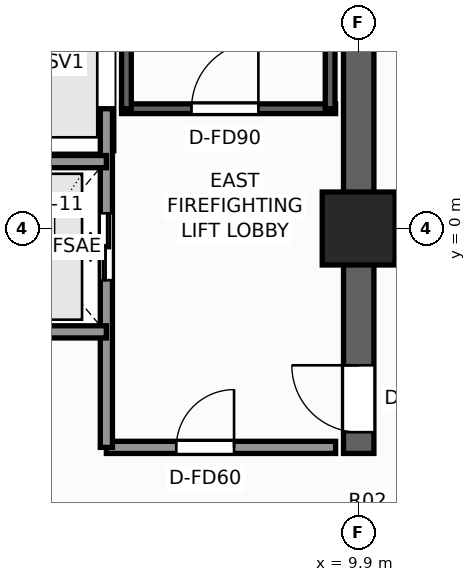
"""IFC4 building model, lengths in metres.
Left out: names, types, materials, properties, quantities, classifications, styles, units other than length and angle.
Written with IfcOpenShell. Run it as: python <this file> out.ifc"""

import sys

from ifc_helpers import new_model, si_unit, direction, frame, frame_2d, origin, origin_2d, place, context, subcontext, project, spatial, rectangle, extrude, element, fill, save


model = new_model("IFC4")
c1 = context("Model", 3, precision=1e-05, world=origin(), true_north=direction((0.0, 1.0)))
c2 = subcontext(c1, "Body", "Model", "MODEL_VIEW")
j1 = project(units=[si_unit("LENGTHUNIT", "METRE"), si_unit("PLANEANGLEUNIT", "RADIAN")], contexts=[c1])
p1 = place(None, origin())
s1 = spatial("IfcSite", under=j1, at=p1, CompositionType="ELEMENT")
p2 = place(p1, origin())
s2 = spatial("IfcBuilding", under=s1, at=p2, CompositionType="ELEMENT")
p3 = place(p2, frame((0.0, 0.0, 180.0)))
s3 = spatial("IfcBuildingStorey", under=s2, at=p3, CompositionType="ELEMENT", Elevation=180.0)
p4 = place(p3, frame((9.9, -3.7, 0.0), z_axis=(0.0, 0.0, 1.0), x_axis=(0.0, 1.0, 0.0)))
e1 = element("IfcWall", 1, at=p4, inside=s3, PredefinedType="SHEAR", context=c2, shape_type="SweptSolid", body=[
    extrude(rectangle(XDim=13.35, YDim=0.5, at=frame_2d((6.675, 0.0))), origin(), (0.0, 0.0, 1.0), 3.3),
])
p5 = place(p4, frame((0.35, 0.0, 0.0)))
e2 = element("IfcOpeningElement", 2, at=p5, cuts=e1, PredefinedType="OPENING", context=c2, shape_type="SweptSolid", body=[
    extrude(rectangle(XDim=1.1, YDim=2.2, at=frame_2d((0.55, 1.1))), frame((0.0, 0.26, 0.0), z_axis=(0.0, -1.0, 0.0), x_axis=(1.0, 0.0, 0.0)), (0.0, 0.0, 1.0), 0.52),
])
p6 = place(p3, frame((9.9, 0.0, 0.0), z_axis=(0.0, 0.0, 1.0), x_axis=(1.0, 0.0, 0.0)))
e3 = element("IfcColumn", 3, at=p6, inside=s3, PredefinedType="COLUMN", context=c2, shape_type="SweptSolid", body=[
    extrude(rectangle(XDim=1.2, YDim=1.2, at=origin_2d()), origin(), (0.0, 0.0, 1.0), 3.3),
])
p7 = place(p3, frame((6.0, 1.97, 0.0), z_axis=(0.0, 0.0, 1.0), x_axis=(1.0, 0.0, 0.0)))
e4 = element("IfcWall", 4, at=p7, inside=s3, PredefinedType="SHEAR", context=c2, shape_type="SweptSolid", body=[
    extrude(rectangle(XDim=3.52, YDim=0.16, at=frame_2d((1.76, 0.0))), origin(), (0.0, 0.0, 1.0), 3.3),
])
p8 = place(p7, frame((1.15, 0.0, 0.0)))
e5 = element("IfcOpeningElement", 5, at=p8, cuts=e4, PredefinedType="OPENING", context=c2, shape_type="SweptSolid", body=[
    extrude(rectangle(XDim=1.1, YDim=2.2, at=frame_2d((0.55, 1.1))), frame((0.0, 0.09, 0.0), z_axis=(0.0, -1.0, 0.0), x_axis=(1.0, 0.0, 0.0)), (0.0, 0.0, 1.0), 0.18),
])
for number, where, z_axis, x_axis in (
    (6, (6.08, 1.97, 0.0), (0.0, 0.0, 1.0), (0.0, 1.0, 0.0)),
    (7, (9.43, 1.97, 0.0), (0.0, 0.0, 1.0), (0.0, 1.0, 0.0)),
):
    element("IfcWall", number, at=place(p3, frame(where, z_axis=z_axis, x_axis=x_axis)), inside=s3, PredefinedType="SHEAR", context=c2, shape_type="SweptSolid", body=[
        extrude(rectangle(XDim=7.56, YDim=0.16, at=frame_2d((3.78, 0.0))), origin(), (0.0, 0.0, 1.0), 3.3),
    ])
p9 = place(p3, frame((5.75, -3.6, 0.0), z_axis=(0.0, 0.0, 1.0), x_axis=(1.0, 0.0, 0.0)))
e8 = element("IfcWall", 8, at=p9, inside=s3, PredefinedType="SOLIDWALL", context=c2, shape_type="SweptSolid", body=[
    extrude(rectangle(XDim=3.77, YDim=0.2, at=frame_2d((1.885, 0.0))), origin(), (0.0, 0.0, 1.0), 3.08),
])
p10 = place(p9, frame((1.15, 0.0, 0.0)))
e9 = element("IfcOpeningElement", 9, at=p10, cuts=e8, PredefinedType="OPENING", context=c2, shape_type="SweptSolid", body=[
    extrude(rectangle(XDim=0.95, YDim=2.06, at=frame_2d((0.475, 1.03))), frame((0.0, 0.11, 0.0), z_axis=(0.0, -1.0, 0.0), x_axis=(1.0, 0.0, 0.0)), (0.0, 0.0, 1.0), 0.22),
])
p11 = place(p3, frame((5.75, -3.6, 0.0), z_axis=(0.0, 0.0, 1.0), x_axis=(0.0, 1.0, 0.0)))
e10 = element("IfcWall", 10, at=p11, inside=s3, PredefinedType="SOLIDWALL", context=c2, shape_type="SweptSolid", body=[
    extrude(rectangle(XDim=5.57, YDim=0.2, at=frame_2d((2.785, 0.0))), origin(), (0.0, 0.0, 1.0), 2.715),
])
p12 = place(p11, frame((2.75, 0.0, 0.0)))
e11 = element("IfcOpeningElement", 11, at=p12, cuts=e10, PredefinedType="OPENING", context=c2, shape_type="SweptSolid", body=[
    extrude(rectangle(XDim=1.1, YDim=2.2, at=frame_2d((0.55, 1.1))), frame((0.0, 0.11, 0.0), z_axis=(0.0, -1.0, 0.0), x_axis=(1.0, 0.0, 0.0)), (0.0, 0.0, 1.0), 0.22),
])
for number, where, z_axis, x_axis in (
    (12, (3.35, -1.7, 0.0), (0.0, 0.0, 1.0), (1.0, 0.0, 0.0)),
    (13, (3.35, 1.1, 0.0), (0.0, 0.0, 1.0), (1.0, 0.0, 0.0)),
):
    element("IfcWall", number, at=place(p3, frame(where, z_axis=z_axis, x_axis=x_axis)), inside=s3, PredefinedType="SOLIDWALL", context=c2, shape_type="SweptSolid", body=[
        extrude(rectangle(XDim=2.4, YDim=0.2, at=frame_2d((1.2, 0.0))), origin(), (0.0, 0.0, 1.0), 3.08),
    ])
p13 = place(p8, origin())
e14 = element("IfcDoor", 14, at=p13, inside=s3, OperationType="SINGLE_SWING_RIGHT", PredefinedType="DOOR", context=c2, shape_type="SweptSolid", body=[
    extrude(rectangle(XDim=1.1, YDim=2.2, at=frame_2d((0.55, 1.1))), frame((0.0, 0.025, 0.0), z_axis=(0.0, -1.0, 0.0), x_axis=(1.0, 0.0, 0.0)), (0.0, 0.0, 1.0), 0.05),
])
fill(e5, e14)
p14 = place(p5, origin())
e15 = element("IfcDoor", 15, at=p14, inside=s3, OperationType="SINGLE_SWING_RIGHT", PredefinedType="DOOR", context=c2, shape_type="SweptSolid", body=[
    extrude(rectangle(XDim=1.1, YDim=2.2, at=frame_2d((0.55, 1.1))), frame((0.0, 0.025, 0.0), z_axis=(0.0, -1.0, 0.0), x_axis=(1.0, 0.0, 0.0)), (0.0, 0.0, 1.0), 0.05),
])
fill(e2, e15)
p15 = place(p12, origin())
e16 = element("IfcDoor", 16, at=p15, inside=s3, OperationType="DOUBLE_DOOR_SLIDING", PredefinedType="DOOR", context=c2, shape_type="SweptSolid", body=[
    extrude(rectangle(XDim=1.1, YDim=2.2, at=frame_2d((0.55, 1.1))), frame((0.0, 0.025, 0.0), z_axis=(0.0, -1.0, 0.0), x_axis=(1.0, 0.0, 0.0)), (0.0, 0.0, 1.0), 0.05),
])
fill(e11, e16)
p16 = place(p10, origin())
e17 = element("IfcDoor", 17, at=p16, inside=s3, OperationType="SINGLE_SWING_RIGHT", PredefinedType="DOOR", context=c2, shape_type="SweptSolid", body=[
    extrude(rectangle(XDim=0.95, YDim=2.06, at=frame_2d((0.475, 1.03))), frame((0.0, 0.025, 0.0), z_axis=(0.0, -1.0, 0.0), x_axis=(1.0, 0.0, 0.0)), (0.0, 0.0, 1.0), 0.05),
])
fill(e9, e17)
save(model, sys.argv[1])
